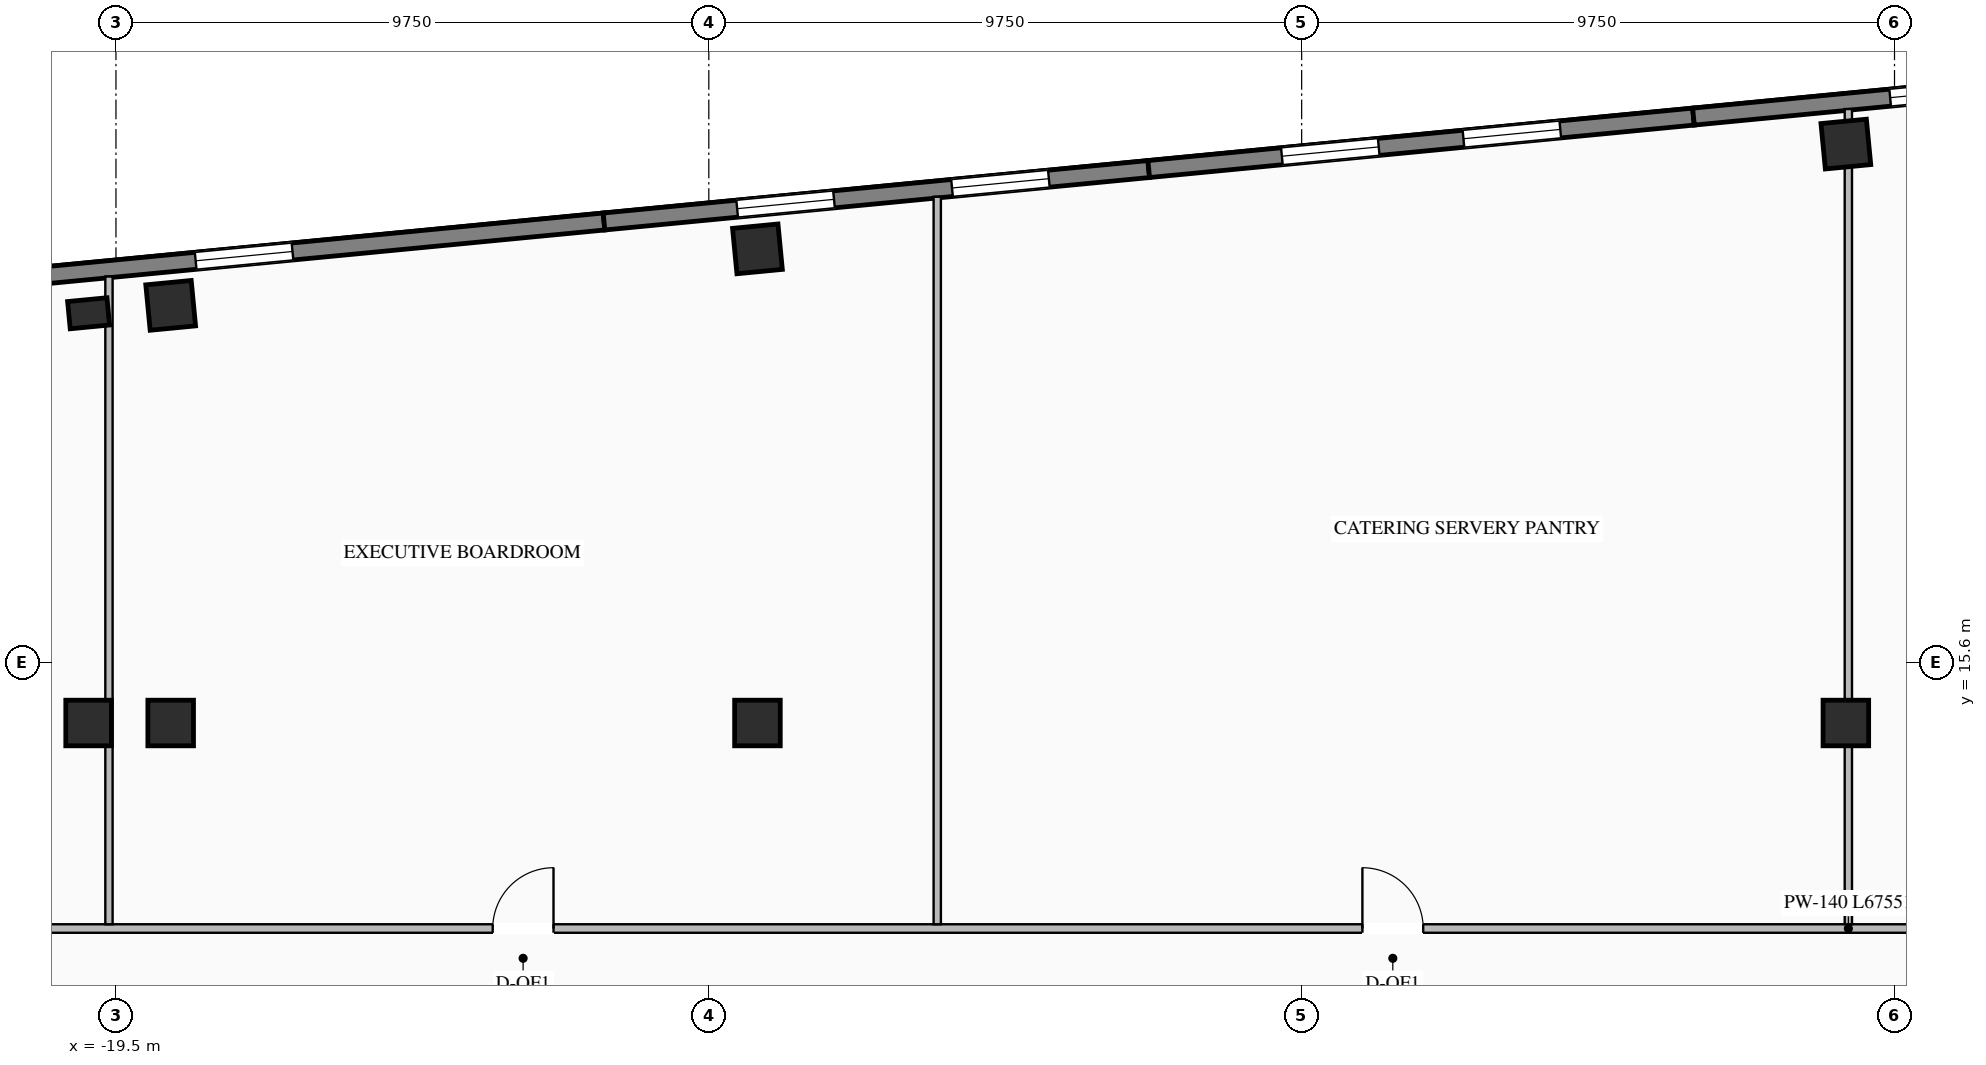
"""IFC4 building model, lengths in metres.
Left out: names, types, materials, properties, quantities, classifications, styles, units other than length and angle.
Written with IfcOpenShell. Run it as: python <this file> out.ifc"""

import sys

from ifc_helpers import new_model, si_unit, direction, frame, frame_2d, origin, origin_2d, place, context, subcontext, project, spatial, rectangle, i_section, extrude, element, fill, save


model = new_model("IFC4")
c1 = context("Model", 3, precision=1e-05, world=origin(), true_north=direction((0.0, 1.0)))
c2 = subcontext(c1, "Body", "Model", "MODEL_VIEW")
j1 = project(units=[si_unit("LENGTHUNIT", "METRE"), si_unit("PLANEANGLEUNIT", "RADIAN")], contexts=[c1])
p1 = place(None, origin())
s1 = spatial("IfcSite", under=j1, at=p1, CompositionType="ELEMENT")
p2 = place(p1, origin())
s2 = spatial("IfcBuilding", under=s1, at=p2, CompositionType="ELEMENT")
p3 = place(p2, frame((0.0, 0.0, 84.55)))
s3 = spatial("IfcBuildingStorey", under=s2, at=p3, CompositionType="ELEMENT", Elevation=84.55)
for number, where, z_axis, x_axis in (
    (1, (-19.95, 14.6, 0.0), (0.0, 0.0, 1.0), (1.0, 0.0, 0.0)),
    (2, (-18.6, 14.6, 0.0), (0.0, 0.0, 1.0), (1.0, 0.0, 0.0)),
    (3, (-8.95, 14.6, 0.0), (0.0, 0.0, 1.0), (1.0, 0.0, 0.0)),
    (4, (8.95, 14.6, 0.0), (0.0, 0.0, 1.0), (1.0, 0.0, 0.0)),
    (5, (-18.6, 21.469, 0.0), (0.0, 0.0, 1.0), (0.995, 0.096, 0.0)),
    (6, (-8.95, 22.398, 0.0), (0.0, 0.0, 1.0), (0.995, 0.096, 0.0)),
    (7, (8.95, 24.122, 0.0), (0.0, 0.0, 1.0), (0.995, 0.096, 0.0)),
):
    element("IfcColumn", number, at=place(p3, frame(where, z_axis=z_axis, x_axis=x_axis)), inside=s3, PredefinedType="COLUMN", context=c2, shape_type="SweptSolid", body=[
        extrude(i_section(OverallWidth=0.75, OverallDepth=0.75, WebThickness=0.03, FlangeThickness=0.044, at=origin_2d()), origin(), (0.0, 0.0, 1.0), 3.45),
    ])
p4 = place(p3, frame((-19.95, 21.339, 0.0), z_axis=(0.0, 0.0, 1.0), x_axis=(0.995396198367, 0.09584575252, 0.0)))
e8 = element("IfcColumn", 8, at=p4, inside=s3, PredefinedType="PILASTER", context=c2, shape_type="SweptSolid", body=[
    extrude(rectangle(XDim=0.65, YDim=0.45, at=origin_2d()), origin(), (0.0, 0.0, 1.0), 3.45),
])
p5 = place(p3, frame((-29.231, 21.138, 0.0), z_axis=(0.0, 0.0, 1.0), x_axis=(0.995395780835, 0.095850088663, 0.0)))
e9 = element("IfcWall", 9, at=p5, inside=s3, PredefinedType="STANDARD", context=c2, shape_type="SweptSolid", body=[
    extrude(rectangle(XDim=17.84, YDim=0.28, at=frame_2d((8.92, 0.0))), origin(), (0.0, 0.0, 1.0), 3.25),
])
p6 = place(p5, frame((5.147, 0.0, 0.76)))
e10 = element("IfcOpeningElement", 10, at=p6, cuts=e9, PredefinedType="OPENING", context=c2, shape_type="SweptSolid", body=[
    extrude(rectangle(XDim=1.6, YDim=1.95, at=frame_2d((0.8, 0.975))), frame((0.0, 0.15, 0.0), z_axis=(0.0, -1.0, 0.0), x_axis=(1.0, 0.0, 0.0)), (0.0, 0.0, 1.0), 0.3),
])
p7 = place(p5, frame((11.093, 0.0, 0.76)))
e11 = element("IfcOpeningElement", 11, at=p7, cuts=e9, PredefinedType="OPENING", context=c2, shape_type="SweptSolid", body=[
    extrude(rectangle(XDim=1.6, YDim=1.95, at=frame_2d((0.8, 0.975))), frame((0.0, 0.15, 0.0), z_axis=(0.0, -1.0, 0.0), x_axis=(1.0, 0.0, 0.0)), (0.0, 0.0, 1.0), 0.3),
])
p8 = place(p3, frame((-11.474, 22.848, 0.0), z_axis=(0.0, 0.0, 1.0), x_axis=(0.995396794462, 0.09583956164, 0.0)))
e12 = element("IfcWall", 12, at=p8, inside=s3, PredefinedType="STANDARD", context=c2, shape_type="SweptSolid", body=[
    extrude(rectangle(XDim=9.0, YDim=0.28, at=frame_2d((4.5, 0.0))), origin(), (0.0, 0.0, 1.0), 3.25),
])
p9 = place(p8, frame((2.2, 0.0, 0.76)))
e13 = element("IfcOpeningElement", 13, at=p9, cuts=e12, PredefinedType="OPENING", context=c2, shape_type="SweptSolid", body=[
    extrude(rectangle(XDim=1.6, YDim=1.95, at=frame_2d((0.8, 0.975))), frame((0.0, 0.15, 0.0), z_axis=(0.0, -1.0, 0.0), x_axis=(1.0, 0.0, 0.0)), (0.0, 0.0, 1.0), 0.3),
])
p10 = place(p8, frame((5.75, 0.0, 0.76)))
e14 = element("IfcOpeningElement", 14, at=p10, cuts=e12, PredefinedType="OPENING", context=c2, shape_type="SweptSolid", body=[
    extrude(rectangle(XDim=1.6, YDim=1.95, at=frame_2d((0.8, 0.975))), frame((0.0, 0.15, 0.0), z_axis=(0.0, -1.0, 0.0), x_axis=(1.0, 0.0, 0.0)), (0.0, 0.0, 1.0), 0.3),
])
p11 = place(p3, frame((-2.515, 23.711, 0.0), z_axis=(0.0, 0.0, 1.0), x_axis=(0.995397043619, 0.095836973841, 0.0)))
e15 = element("IfcWall", 15, at=p11, inside=s3, PredefinedType="STANDARD", context=c2, shape_type="SweptSolid", body=[
    extrude(rectangle(XDim=9.0, YDim=0.28, at=frame_2d((4.5, 0.0))), origin(), (0.0, 0.0, 1.0), 3.25),
])
p12 = place(p11, frame((2.2, 0.0, 0.76)))
e16 = element("IfcOpeningElement", 16, at=p12, cuts=e15, PredefinedType="OPENING", context=c2, shape_type="SweptSolid", body=[
    extrude(rectangle(XDim=1.6, YDim=1.95, at=frame_2d((0.8, 0.975))), frame((0.0, 0.15, 0.0), z_axis=(0.0, -1.0, 0.0), x_axis=(1.0, 0.0, 0.0)), (0.0, 0.0, 1.0), 0.3),
])
p13 = place(p11, frame((5.2, 0.0, 0.76)))
e17 = element("IfcOpeningElement", 17, at=p13, cuts=e15, PredefinedType="OPENING", context=c2, shape_type="SweptSolid", body=[
    extrude(rectangle(XDim=1.6, YDim=1.95, at=frame_2d((0.8, 0.975))), frame((0.0, 0.15, 0.0), z_axis=(0.0, -1.0, 0.0), x_axis=(1.0, 0.0, 0.0)), (0.0, 0.0, 1.0), 0.3),
])
p14 = place(p3, frame((6.444, 24.573, 0.0), z_axis=(0.0, 0.0, 1.0), x_axis=(0.995396794462, 0.09583956164, 0.0)))
e18 = element("IfcWall", 18, at=p14, inside=s3, PredefinedType="STANDARD", context=c2, shape_type="SweptSolid", body=[
    extrude(rectangle(XDim=9.0, YDim=0.28, at=frame_2d((4.5, 0.0))), origin(), (0.0, 0.0, 1.0), 3.25),
])
p15 = place(p14, frame((3.25, 0.0, 0.76)))
e19 = element("IfcOpeningElement", 19, at=p15, cuts=e18, PredefinedType="OPENING", context=c2, shape_type="SweptSolid", body=[
    extrude(rectangle(XDim=1.6, YDim=1.95, at=frame_2d((0.8, 0.975))), frame((0.0, 0.15, 0.0), z_axis=(0.0, -1.0, 0.0), x_axis=(1.0, 0.0, 0.0)), (0.0, 0.0, 1.0), 0.3),
])
p16 = place(p14, frame((5.2, 0.0, 0.76)))
e20 = element("IfcOpeningElement", 20, at=p16, cuts=e18, PredefinedType="OPENING", context=c2, shape_type="SweptSolid", body=[
    extrude(rectangle(XDim=1.6, YDim=1.95, at=frame_2d((0.8, 0.975))), frame((0.0, 0.15, 0.0), z_axis=(0.0, -1.0, 0.0), x_axis=(1.0, 0.0, 0.0)), (0.0, 0.0, 1.0), 0.3),
])
p17 = place(p3, frame((-30.567, 11.22, 0.0), z_axis=(0.0, 0.0, 1.0), x_axis=(1.0, 0.0, 0.0)))
e21 = element("IfcWall", 21, at=p17, inside=s3, PredefinedType="STANDARD", context=c2, shape_type="SweptSolid", body=[
    extrude(rectangle(XDim=67.551, YDim=0.14, at=frame_2d((33.775, 0.0))), origin(), (0.0, 0.0, 1.0), 3.25),
])
p18 = place(p17, frame((5.102, 0.0, 0.0)))
e22 = element("IfcOpeningElement", 22, at=p18, cuts=e21, PredefinedType="OPENING", context=c2, shape_type="SweptSolid", body=[
    extrude(rectangle(XDim=1.0, YDim=2.08, at=frame_2d((0.5, 1.04))), frame((0.0, 0.08, 0.0), z_axis=(0.0, -1.0, 0.0), x_axis=(1.0, 0.0, 0.0)), (0.0, 0.0, 1.0), 0.16),
])
p19 = place(p17, frame((17.263, 0.0, 0.0)))
e23 = element("IfcOpeningElement", 23, at=p19, cuts=e21, PredefinedType="OPENING", context=c2, shape_type="SweptSolid", body=[
    extrude(rectangle(XDim=1.0, YDim=2.08, at=frame_2d((0.5, 1.04))), frame((0.0, 0.08, 0.0), z_axis=(0.0, -1.0, 0.0), x_axis=(1.0, 0.0, 0.0)), (0.0, 0.0, 1.0), 0.16),
])
p20 = place(p17, frame((31.566, 0.0, 0.0)))
e24 = element("IfcOpeningElement", 24, at=p20, cuts=e21, PredefinedType="OPENING", context=c2, shape_type="SweptSolid", body=[
    extrude(rectangle(XDim=1.0, YDim=2.08, at=frame_2d((0.5, 1.04))), frame((0.0, 0.08, 0.0), z_axis=(0.0, -1.0, 0.0), x_axis=(1.0, 0.0, 0.0)), (0.0, 0.0, 1.0), 0.16),
])
p21 = place(p17, frame((46.551, 0.0, 0.0)))
e25 = element("IfcOpeningElement", 25, at=p21, cuts=e21, PredefinedType="OPENING", context=c2, shape_type="SweptSolid", body=[
    extrude(rectangle(XDim=1.0, YDim=2.08, at=frame_2d((0.5, 1.04))), frame((0.0, 0.08, 0.0), z_axis=(0.0, -1.0, 0.0), x_axis=(1.0, 0.0, 0.0)), (0.0, 0.0, 1.0), 0.16),
])
p22 = place(p17, frame((60.421, 0.0, 0.0)))
e26 = element("IfcOpeningElement", 26, at=p22, cuts=e21, PredefinedType="OPENING", context=c2, shape_type="SweptSolid", body=[
    extrude(rectangle(XDim=1.0, YDim=2.08, at=frame_2d((0.5, 1.04))), frame((0.0, 0.08, 0.0), z_axis=(0.0, -1.0, 0.0), x_axis=(1.0, 0.0, 0.0)), (0.0, 0.0, 1.0), 0.16),
])
p23 = place(p3, frame((-19.615, 11.29, 0.0), z_axis=(0.0, 0.0, 1.0), x_axis=(0.0, 1.0, 0.0)))
e27 = element("IfcWall", 27, at=p23, inside=s3, PredefinedType="STANDARD", context=c2, shape_type="SweptSolid", body=[
    extrude(rectangle(XDim=10.654, YDim=0.12, at=frame_2d((5.327, 0.0))), origin(), (0.0, 0.0, 1.0), 3.25),
])
p24 = place(p3, frame((-5.993, 11.29, 0.0), z_axis=(0.0, 0.0, 1.0), x_axis=(0.0, 1.0, 0.0)))
e28 = element("IfcWall", 28, at=p24, inside=s3, PredefinedType="STANDARD", context=c2, shape_type="SweptSolid", body=[
    extrude(rectangle(XDim=11.966, YDim=0.12, at=frame_2d((5.983, 0.0))), origin(), (0.0, 0.0, 1.0), 3.25),
])
p25 = place(p3, frame((8.991, 11.29, 0.0), z_axis=(0.0, 0.0, 1.0), x_axis=(0.0, 1.0, 0.0)))
e29 = element("IfcWall", 29, at=p25, inside=s3, PredefinedType="STANDARD", context=c2, shape_type="SweptSolid", body=[
    extrude(rectangle(XDim=13.408, YDim=0.12, at=frame_2d((6.704, 0.0))), origin(), (0.0, 0.0, 1.0), 2.645),
])
p26 = place(p7, origin())
e30 = element("IfcWindow", 30, at=p26, inside=s3, PartitioningType="SINGLE_PANEL", PredefinedType="WINDOW", context=c2, shape_type="SweptSolid", body=[
    extrude(rectangle(XDim=1.6, YDim=1.95, at=frame_2d((0.8, 0.975))), frame((0.0, 0.03, 0.0), z_axis=(0.0, -1.0, 0.0), x_axis=(1.0, 0.0, 0.0)), (0.0, 0.0, 1.0), 0.06),
])
fill(e11, e30)
p27 = place(p9, origin())
e31 = element("IfcWindow", 31, at=p27, inside=s3, PartitioningType="SINGLE_PANEL", PredefinedType="WINDOW", context=c2, shape_type="SweptSolid", body=[
    extrude(rectangle(XDim=1.6, YDim=1.95, at=frame_2d((0.8, 0.975))), frame((0.0, 0.03, 0.0), z_axis=(0.0, -1.0, 0.0), x_axis=(1.0, 0.0, 0.0)), (0.0, 0.0, 1.0), 0.06),
])
fill(e13, e31)
p28 = place(p10, origin())
e32 = element("IfcWindow", 32, at=p28, inside=s3, PartitioningType="SINGLE_PANEL", PredefinedType="WINDOW", context=c2, shape_type="SweptSolid", body=[
    extrude(rectangle(XDim=1.6, YDim=1.95, at=frame_2d((0.8, 0.975))), frame((0.0, 0.03, 0.0), z_axis=(0.0, -1.0, 0.0), x_axis=(1.0, 0.0, 0.0)), (0.0, 0.0, 1.0), 0.06),
])
fill(e14, e32)
p29 = place(p12, origin())
e33 = element("IfcWindow", 33, at=p29, inside=s3, PartitioningType="SINGLE_PANEL", PredefinedType="WINDOW", context=c2, shape_type="SweptSolid", body=[
    extrude(rectangle(XDim=1.6, YDim=1.95, at=frame_2d((0.8, 0.975))), frame((0.0, 0.03, 0.0), z_axis=(0.0, -1.0, 0.0), x_axis=(1.0, 0.0, 0.0)), (0.0, 0.0, 1.0), 0.06),
])
fill(e16, e33)
p30 = place(p13, origin())
e34 = element("IfcWindow", 34, at=p30, inside=s3, PartitioningType="SINGLE_PANEL", PredefinedType="WINDOW", context=c2, shape_type="SweptSolid", body=[
    extrude(rectangle(XDim=1.6, YDim=1.95, at=frame_2d((0.8, 0.975))), frame((0.0, 0.03, 0.0), z_axis=(0.0, -1.0, 0.0), x_axis=(1.0, 0.0, 0.0)), (0.0, 0.0, 1.0), 0.06),
])
fill(e17, e34)
p31 = place(p15, origin())
e35 = element("IfcWindow", 35, at=p31, inside=s3, PartitioningType="SINGLE_PANEL", PredefinedType="WINDOW", context=c2, shape_type="SweptSolid", body=[
    extrude(rectangle(XDim=1.6, YDim=1.95, at=frame_2d((0.8, 0.975))), frame((0.0, 0.03, 0.0), z_axis=(0.0, -1.0, 0.0), x_axis=(1.0, 0.0, 0.0)), (0.0, 0.0, 1.0), 0.06),
])
fill(e19, e35)
p32 = place(p19, origin())
e36 = element("IfcDoor", 36, at=p32, inside=s3, OperationType="SINGLE_SWING_RIGHT", PredefinedType="DOOR", context=c2, shape_type="SweptSolid", body=[
    extrude(rectangle(XDim=1.0, YDim=2.08, at=frame_2d((0.5, 1.04))), frame((0.0, 0.025, 0.0), z_axis=(0.0, -1.0, 0.0), x_axis=(1.0, 0.0, 0.0)), (0.0, 0.0, 1.0), 0.05),
])
fill(e23, e36)
p33 = place(p20, origin())
e37 = element("IfcDoor", 37, at=p33, inside=s3, OperationType="SINGLE_SWING_LEFT", PredefinedType="DOOR", context=c2, shape_type="SweptSolid", body=[
    extrude(rectangle(XDim=1.0, YDim=2.08, at=frame_2d((0.5, 1.04))), frame((0.0, 0.025, 0.0), z_axis=(0.0, -1.0, 0.0), x_axis=(1.0, 0.0, 0.0)), (0.0, 0.0, 1.0), 0.05),
])
fill(e24, e37)
save(model, sys.argv[1])
